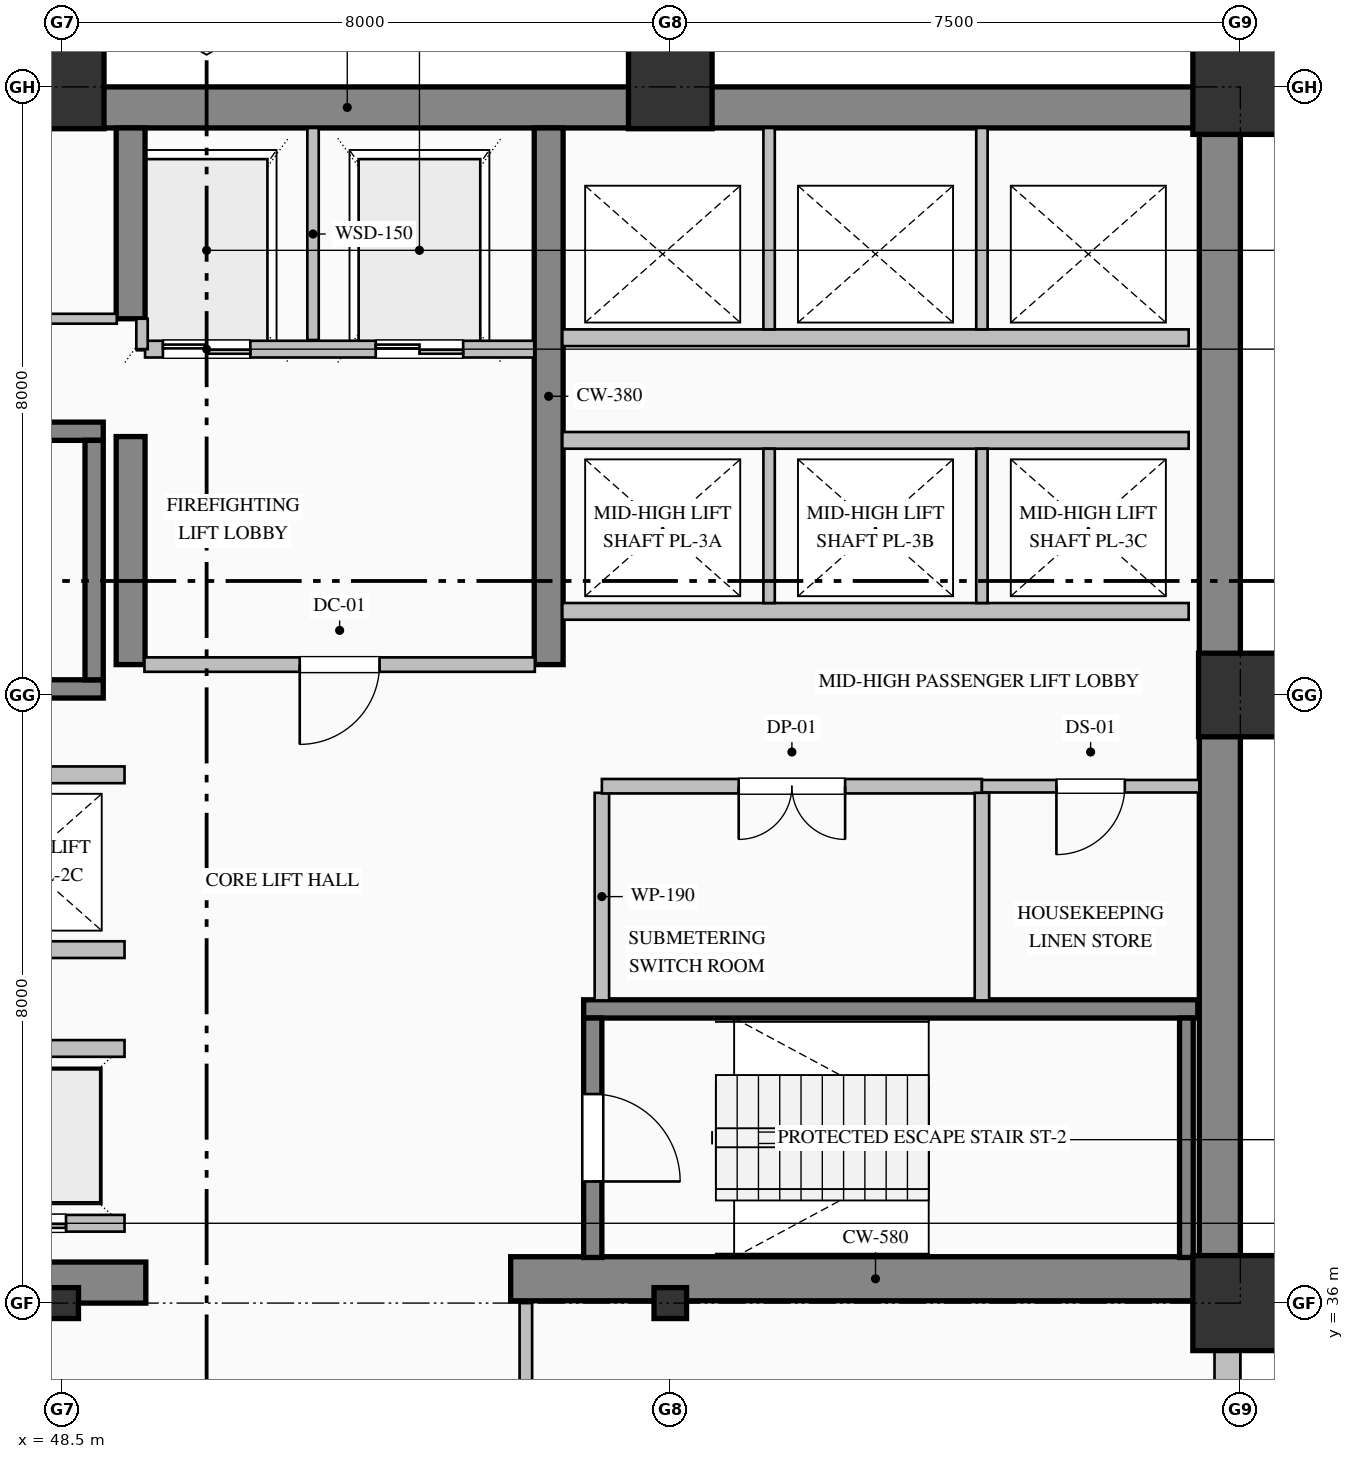
"""IFC4 building model, lengths in metres.
Left out: names, types, materials, properties, quantities, classifications, styles, units other than length and angle.
Written with IfcOpenShell. Run it as: python <this file> out.ifc"""

import sys

from ifc_helpers import new_model, si_unit, direction, frame, frame_2d, origin, origin_2d, place, context, subcontext, project, spatial, rectangle, hollow_rectangle, i_section, extrude, element, fill, save


model = new_model("IFC4")
c1 = context("Model", 3, precision=1e-05, world=origin(), true_north=direction((0.0, 1.0)))
c2 = subcontext(c1, "Body", "Model", "MODEL_VIEW")
j1 = project(units=[si_unit("LENGTHUNIT", "METRE"), si_unit("PLANEANGLEUNIT", "RADIAN")], contexts=[c1])
p1 = place(None, origin())
s1 = spatial("IfcSite", under=j1, at=p1, CompositionType="ELEMENT")
p2 = place(p1, origin())
s2 = spatial("IfcBuilding", under=s1, at=p2, CompositionType="ELEMENT")
p3 = place(p2, frame((0.0, 0.0, 64.2)))
s3 = spatial("IfcBuildingStorey", under=s2, at=p3, CompositionType="ELEMENT", Elevation=64.2)
p4 = place(p3, frame((40.5, 51.73, 0.0), z_axis=(0.0, 0.0, 1.0), x_axis=(1.0, 0.0, 0.0)))
e1 = element("IfcWall", 1, at=p4, inside=s3, PredefinedType="SHEAR", context=c2, shape_type="SweptSolid", body=[
    extrude(rectangle(XDim=23.5, YDim=0.54, at=frame_2d((11.75, 0.0))), origin(), (0.0, 0.0, 1.0), 3.75),
])
p5 = place(p3, frame((63.73, 36.32, 0.0), z_axis=(0.0, 0.0, 1.0), x_axis=(0.0, 1.0, 0.0)))
e2 = element("IfcWall", 2, at=p5, inside=s3, PredefinedType="SHEAR", context=c2, shape_type="SweptSolid", body=[
    extrude(rectangle(XDim=15.14, YDim=0.54, at=frame_2d((7.57, 0.0))), origin(), (0.0, 0.0, 1.0), 3.75),
])
p6 = place(p3, frame((48.2, 36.27, 0.0), z_axis=(0.0, 0.0, 1.0), x_axis=(1.0, 0.0, 0.0)))
e3 = element("IfcWall", 3, at=p6, inside=s3, PredefinedType="SHEAR", context=c2, shape_type="SweptSolid", body=[
    extrude(rectangle(XDim=1.4, YDim=0.54, at=frame_2d((0.7, 0.0))), origin(), (0.0, 0.0, 1.0), 3.75),
])
p7 = place(p3, frame((54.4, 36.32, 0.0), z_axis=(0.0, 0.0, 1.0), x_axis=(1.0, 0.0, 0.0)))
e4 = element("IfcWall", 4, at=p7, inside=s3, PredefinedType="SHEAR", context=c2, shape_type="SweptSolid", body=[
    extrude(rectangle(XDim=9.6, YDim=0.58, at=frame_2d((4.8, 0.0))), origin(), (0.0, 0.0, 1.0), 4.0),
])
p8 = place(p3, frame((49.4, 44.4, 0.0), z_axis=(0.0, 0.0, 1.0), x_axis=(0.0, 1.0, 0.0)))
e5 = element("IfcWall", 5, at=p8, inside=s3, PredefinedType="SHEAR", context=c2, shape_type="SweptSolid", body=[
    extrude(rectangle(XDim=3.0, YDim=0.38, at=frame_2d((1.5, 0.0))), origin(), (0.0, 0.0, 1.0), 3.75),
])
p9 = place(p3, frame((49.4, 48.95, 0.0), z_axis=(0.0, 0.0, 1.0), x_axis=(0.0, 1.0, 0.0)))
e6 = element("IfcWall", 6, at=p9, inside=s3, PredefinedType="SHEAR", context=c2, shape_type="SweptSolid", body=[
    extrude(rectangle(XDim=2.51, YDim=0.38, at=frame_2d((1.255, 0.0))), origin(), (0.0, 0.0, 1.0), 3.75),
])
p10 = place(p3, frame((54.9, 44.4, 0.0), z_axis=(0.0, 0.0, 1.0), x_axis=(0.0, 1.0, 0.0)))
e7 = element("IfcWall", 7, at=p10, inside=s3, PredefinedType="SHEAR", context=c2, shape_type="SweptSolid", body=[
    extrude(rectangle(XDim=7.06, YDim=0.38, at=frame_2d((3.53, 0.0))), origin(), (0.0, 0.0, 1.0), 3.75),
])
p11 = place(p3, frame((48.5, 36.0, 0.0), z_axis=(0.0, 0.0, 1.0), x_axis=(1.0, 0.0, 0.0)))
e8 = element("IfcColumn", 8, at=p11, inside=s3, PredefinedType="COLUMN", context=c2, shape_type="SweptSolid", body=[
    extrude(i_section(OverallWidth=0.407, OverallDepth=0.428, WebThickness=0.02, FlangeThickness=0.035, FilletRadius=0.022, at=origin_2d()), origin(), (0.0, 0.0, 1.0), 4.0),
])
p12 = place(p3, frame((48.5, 52.0, 0.0), z_axis=(0.0, 0.0, 1.0), x_axis=(1.0, 0.0, 0.0)))
e9 = element("IfcColumn", 9, at=p12, inside=s3, PredefinedType="COLUMN", context=c2, shape_type="SweptSolid", body=[
    extrude(hollow_rectangle(XDim=1.1, YDim=1.1, WallThickness=0.04, at=origin_2d()), origin(), (0.0, 0.0, 1.0), 4.0),
])
p13 = place(p3, frame((56.5, 36.0, 0.0), z_axis=(0.0, 0.0, 1.0), x_axis=(1.0, 0.0, 0.0)))
e10 = element("IfcColumn", 10, at=p13, inside=s3, PredefinedType="COLUMN", context=c2, shape_type="SweptSolid", body=[
    extrude(i_section(OverallWidth=0.407, OverallDepth=0.428, WebThickness=0.02, FlangeThickness=0.035, FilletRadius=0.022, at=origin_2d()), origin(), (0.0, 0.0, 1.0), 4.0),
])
p14 = place(p3, frame((56.5, 52.0, 0.0), z_axis=(0.0, 0.0, 1.0), x_axis=(1.0, 0.0, 0.0)))
e11 = element("IfcColumn", 11, at=p14, inside=s3, PredefinedType="COLUMN", context=c2, shape_type="SweptSolid", body=[
    extrude(hollow_rectangle(XDim=1.1, YDim=1.1, WallThickness=0.04, at=origin_2d()), origin(), (0.0, 0.0, 1.0), 4.0),
])
p15 = place(p3, frame((64.0, 36.0, 0.0), z_axis=(0.0, 0.0, 1.0), x_axis=(1.0, 0.0, 0.0)))
e12 = element("IfcColumn", 12, at=p15, inside=s3, PredefinedType="COLUMN", context=c2, shape_type="SweptSolid", body=[
    extrude(hollow_rectangle(XDim=1.25, YDim=1.25, WallThickness=0.045, at=origin_2d()), origin(), (0.0, 0.0, 1.0), 4.0),
])
p16 = place(p3, frame((64.0, 44.0, 0.0), z_axis=(0.0, 0.0, 1.0), x_axis=(1.0, 0.0, 0.0)))
e13 = element("IfcColumn", 13, at=p16, inside=s3, PredefinedType="COLUMN", context=c2, shape_type="SweptSolid", body=[
    extrude(hollow_rectangle(XDim=1.1, YDim=1.1, WallThickness=0.04, at=origin_2d()), origin(), (0.0, 0.0, 1.0), 4.0),
])
p17 = place(p3, frame((64.0, 52.0, 0.0), z_axis=(0.0, 0.0, 1.0), x_axis=(1.0, 0.0, 0.0)))
e14 = element("IfcColumn", 14, at=p17, inside=s3, PredefinedType="COLUMN", context=c2, shape_type="SweptSolid", body=[
    extrude(hollow_rectangle(XDim=1.25, YDim=1.25, WallThickness=0.045, at=origin_2d()), origin(), (0.0, 0.0, 1.0), 4.0),
])
p18 = place(p3, frame((63.83, 36.05, 0.0), z_axis=(0.0, 0.0, 1.0), x_axis=(0.0, -1.0, 0.0)))
e15 = element("IfcWall", 15, at=p18, inside=s3, PredefinedType="SOLIDWALL", context=c2, shape_type="SweptSolid", body=[
    extrude(rectangle(XDim=28.05, YDim=0.34, at=frame_2d((14.025, 0.0))), origin(), (0.0, 0.0, 1.0), 3.25),
])
p19 = place(p18, frame((2.7, 0.0, 0.85)))
e16 = element("IfcOpeningElement", 16, at=p19, cuts=e15, PredefinedType="OPENING", context=c2, shape_type="SweptSolid", body=[
    extrude(rectangle(XDim=1.8, YDim=2.05, at=frame_2d((0.9, 1.025))), frame((0.0, 0.18, 0.0), z_axis=(0.0, -1.0, 0.0), x_axis=(1.0, 0.0, 0.0)), (0.0, 0.0, 1.0), 0.36),
])
p20 = place(p18, frame((9.6, 0.0, 0.8)))
e17 = element("IfcOpeningElement", 17, at=p20, cuts=e15, PredefinedType="OPENING", context=c2, shape_type="SweptSolid", body=[
    extrude(rectangle(XDim=2.4, YDim=2.15, at=frame_2d((1.2, 1.075))), frame((0.0, 0.18, 0.0), z_axis=(0.0, -1.0, 0.0), x_axis=(1.0, 0.0, 0.0)), (0.0, 0.0, 1.0), 0.36),
])
for number, where, z_axis, x_axis in (
    (18, (40.96, 47.47, 0.0), (0.0, 0.0, 1.0), (1.0, 0.0, 0.0)),
    (19, (49.04, 44.08, 0.0), (0.0, 0.0, 1.0), (-1.0, 0.0, 0.0)),
):
    element("IfcWall", number, at=place(p3, frame(where, z_axis=z_axis, x_axis=x_axis)), inside=s3, PredefinedType="SOLIDWALL", context=c2, shape_type="SweptSolid", body=[
        extrude(rectangle(XDim=8.08, YDim=0.24, at=frame_2d((4.04, 0.0))), origin(), (0.0, 0.0, 1.0), 4.0),
    ])
p21 = place(p3, frame((48.92, 44.2, 0.0), z_axis=(0.0, 0.0, 1.0), x_axis=(0.0, 1.0, 0.0)))
e20 = element("IfcWall", 20, at=p21, inside=s3, PredefinedType="SOLIDWALL", context=c2, shape_type="SweptSolid", body=[
    extrude(rectangle(XDim=3.15, YDim=0.24, at=frame_2d((1.575, 0.0))), origin(), (0.0, 0.0, 1.0), 4.0),
])
p22 = place(p3, frame((55.36, 39.87, 0.0), z_axis=(0.0, 0.0, 1.0), x_axis=(1.0, 0.0, 0.0)))
e21 = element("IfcWall", 21, at=p22, inside=s3, PredefinedType="SOLIDWALL", context=c2, shape_type="SweptSolid", body=[
    extrude(rectangle(XDim=8.08, YDim=0.24, at=frame_2d((4.04, 0.0))), origin(), (0.0, 0.0, 1.0), 4.0),
])
p23 = place(p3, frame((55.48, 39.75, 0.0), z_axis=(0.0, 0.0, 1.0), x_axis=(0.0, -1.0, 0.0)))
e22 = element("IfcWall", 22, at=p23, inside=s3, PredefinedType="SOLIDWALL", context=c2, shape_type="SweptSolid", body=[
    extrude(rectangle(XDim=3.15, YDim=0.24, at=frame_2d((1.575, 0.0))), origin(), (0.0, 0.0, 1.0), 4.0),
])
p24 = place(p23, frame((1.0, 0.0, 0.0)))
e23 = element("IfcOpeningElement", 23, at=p24, cuts=e22, PredefinedType="OPENING", context=c2, shape_type="SweptSolid", body=[
    extrude(rectangle(XDim=1.15, YDim=2.2, at=frame_2d((0.575, 1.1))), frame((0.0, 0.13, 0.0), z_axis=(0.0, -1.0, 0.0), x_axis=(1.0, 0.0, 0.0)), (0.0, 0.0, 1.0), 0.26),
])
p25 = place(p3, frame((63.29, 36.6, 0.0), z_axis=(0.0, 0.0, 1.0), x_axis=(0.0, 1.0, 0.0)))
e24 = element("IfcWall", 24, at=p25, inside=s3, PredefinedType="SOLIDWALL", context=c2, shape_type="SweptSolid", body=[
    extrude(rectangle(XDim=3.15, YDim=0.18, at=frame_2d((1.575, 0.0))), origin(), (0.0, 0.0, 1.0), 4.0),
])
p26 = place(p3, frame((54.71, 48.55, 0.0), z_axis=(0.0, 0.0, 1.0), x_axis=(-1.0, 0.0, 0.0)))
e25 = element("IfcWall", 25, at=p26, inside=s3, PredefinedType="PARTITIONING", context=c2, shape_type="SweptSolid", body=[
    extrude(rectangle(XDim=5.12, YDim=0.22, at=frame_2d((2.56, 0.0))), origin(), (0.0, 0.0, 1.0), 3.75),
])
p27 = place(p26, frame((3.735, 0.0, 0.0)))
e26 = element("IfcOpeningElement", 26, at=p27, cuts=e25, PredefinedType="OPENING", context=c2, shape_type="SweptSolid", body=[
    extrude(rectangle(XDim=1.15, YDim=2.2, at=frame_2d((0.575, 1.1))), frame((0.0, 0.12, 0.0), z_axis=(0.0, -1.0, 0.0), x_axis=(1.0, 0.0, 0.0)), (0.0, 0.0, 1.0), 0.24),
])
p28 = place(p26, frame((0.935, 0.0, 0.0)))
e27 = element("IfcOpeningElement", 27, at=p28, cuts=e25, PredefinedType="OPENING", context=c2, shape_type="SweptSolid", body=[
    extrude(rectangle(XDim=1.15, YDim=2.2, at=frame_2d((0.575, 1.1))), frame((0.0, 0.12, 0.0), z_axis=(0.0, -1.0, 0.0), x_axis=(1.0, 0.0, 0.0)), (0.0, 0.0, 1.0), 0.24),
])
p29 = place(p3, frame((51.8, 48.67, 0.0), z_axis=(0.0, 0.0, 1.0), x_axis=(0.0, 1.0, 0.0)))
e28 = element("IfcWall", 28, at=p29, inside=s3, PredefinedType="PARTITIONING", context=c2, shape_type="SweptSolid", body=[
    extrude(rectangle(XDim=2.79, YDim=0.15, at=frame_2d((1.395, 0.0))), origin(), (0.0, 0.0, 1.0), 3.75),
])
p30 = place(p3, frame((49.55, 48.55, 0.0), z_axis=(0.0, 0.0, 1.0), x_axis=(0.0, 1.0, 0.0)))
e29 = element("IfcWall", 29, at=p30, inside=s3, PredefinedType="PARTITIONING", context=c2, shape_type="SweptSolid", body=[
    extrude(rectangle(XDim=0.4, YDim=0.15, at=frame_2d((0.2, 0.0))), origin(), (0.0, 0.0, 1.0), 3.75),
])
p31 = place(p3, frame((49.32, 37.05, 0.0), z_axis=(0.0, 0.0, 1.0), x_axis=(-1.0, 0.0, 0.0)))
e30 = element("IfcWall", 30, at=p31, inside=s3, PredefinedType="PARTITIONING", context=c2, shape_type="SweptSolid", body=[
    extrude(rectangle(XDim=8.24, YDim=0.22, at=frame_2d((4.12, 0.0))), origin(), (0.0, 0.0, 1.0), 3.75),
])
p32 = place(p31, frame((6.37, 0.0, 0.0)))
e31 = element("IfcOpeningElement", 31, at=p32, cuts=e30, PredefinedType="OPENING", context=c2, shape_type="SweptSolid", body=[
    extrude(rectangle(XDim=1.1, YDim=2.2, at=frame_2d((0.55, 1.1))), frame((0.0, 0.12, 0.0), z_axis=(0.0, -1.0, 0.0), x_axis=(1.0, 0.0, 0.0)), (0.0, 0.0, 1.0), 0.24),
])
p33 = place(p31, frame((3.57, 0.0, 0.0)))
e32 = element("IfcOpeningElement", 32, at=p33, cuts=e30, PredefinedType="OPENING", context=c2, shape_type="SweptSolid", body=[
    extrude(rectangle(XDim=1.1, YDim=2.2, at=frame_2d((0.55, 1.1))), frame((0.0, 0.12, 0.0), z_axis=(0.0, -1.0, 0.0), x_axis=(1.0, 0.0, 0.0)), (0.0, 0.0, 1.0), 0.24),
])
p34 = place(p31, frame((0.77, 0.0, 0.0)))
e33 = element("IfcOpeningElement", 33, at=p34, cuts=e30, PredefinedType="OPENING", context=c2, shape_type="SweptSolid", body=[
    extrude(rectangle(XDim=1.1, YDim=2.2, at=frame_2d((0.55, 1.1))), frame((0.0, 0.12, 0.0), z_axis=(0.0, -1.0, 0.0), x_axis=(1.0, 0.0, 0.0)), (0.0, 0.0, 1.0), 0.24),
])
for number, where, z_axis, x_axis in (
    (34, (41.08, 39.35, 0.0), (0.0, 0.0, 1.0), (1.0, 0.0, 0.0)),
    (35, (49.32, 40.65, 0.0), (0.0, 0.0, 1.0), (-1.0, 0.0, 0.0)),
    (36, (41.08, 42.95, 0.0), (0.0, 0.0, 1.0), (1.0, 0.0, 0.0)),
    (37, (63.32, 45.1, 0.0), (0.0, 0.0, 1.0), (-1.0, 0.0, 0.0)),
    (38, (55.08, 47.35, 0.0), (0.0, 0.0, 1.0), (1.0, 0.0, 0.0)),
):
    element("IfcWall", number, at=place(p3, frame(where, z_axis=z_axis, x_axis=x_axis)), inside=s3, PredefinedType="PARTITIONING", context=c2, shape_type="SweptSolid", body=[
        extrude(rectangle(XDim=8.24, YDim=0.22, at=frame_2d((4.12, 0.0))), origin(), (0.0, 0.0, 1.0), 3.75),
    ])
for number, where, z_axis, x_axis in (
    (39, (57.8, 45.21, 0.0), (0.0, 0.0, 1.0), (0.0, 1.0, 0.0)),
    (40, (60.6, 45.21, 0.0), (0.0, 0.0, 1.0), (0.0, 1.0, 0.0)),
):
    element("IfcWall", number, at=place(p3, frame(where, z_axis=z_axis, x_axis=x_axis)), inside=s3, PredefinedType="PARTITIONING", context=c2, shape_type="SweptSolid", body=[
        extrude(rectangle(XDim=2.03, YDim=0.15, at=frame_2d((1.015, 0.0))), origin(), (0.0, 0.0, 1.0), 3.75),
    ])
p35 = place(p3, frame((63.32, 48.7, 0.0), z_axis=(0.0, 0.0, 1.0), x_axis=(-1.0, 0.0, 0.0)))
e41 = element("IfcWall", 41, at=p35, inside=s3, PredefinedType="PARTITIONING", context=c2, shape_type="SweptSolid", body=[
    extrude(rectangle(XDim=8.24, YDim=0.22, at=frame_2d((4.12, 0.0))), origin(), (0.0, 0.0, 1.0), 3.75),
])
for number, where, z_axis, x_axis in (
    (42, (57.8, 48.81, 0.0), (0.0, 0.0, 1.0), (0.0, 1.0, 0.0)),
    (43, (60.6, 48.81, 0.0), (0.0, 0.0, 1.0), (0.0, 1.0, 0.0)),
):
    element("IfcWall", number, at=place(p3, frame(where, z_axis=z_axis, x_axis=x_axis)), inside=s3, PredefinedType="PARTITIONING", context=c2, shape_type="SweptSolid", body=[
        extrude(rectangle(XDim=2.65, YDim=0.15, at=frame_2d((1.325, 0.0))), origin(), (0.0, 0.0, 1.0), 3.75),
    ])
p36 = place(p3, frame((43.5, 48.95, 0.0), z_axis=(0.0, 0.0, 1.0), x_axis=(1.0, 0.0, 0.0)))
e44 = element("IfcWall", 44, at=p36, inside=s3, PredefinedType="PARTITIONING", context=c2, shape_type="SweptSolid", body=[
    extrude(rectangle(XDim=5.718, YDim=0.13, at=frame_2d((2.859, 0.0))), origin(), (0.0, 0.0, 1.0), 3.75),
])
p37 = place(p36, frame((2.399, 0.0, 0.0)))
e45 = element("IfcOpeningElement", 45, at=p37, cuts=e44, PredefinedType="OPENING", context=c2, shape_type="SweptSolid", body=[
    extrude(rectangle(XDim=0.92, YDim=2.15, at=frame_2d((0.46, 1.075))), frame((0.0, 0.075, 0.0), z_axis=(0.0, -1.0, 0.0), x_axis=(1.0, 0.0, 0.0)), (0.0, 0.0, 1.0), 0.15),
])
p38 = place(p3, frame((54.718, 44.4, 0.0), z_axis=(0.0, 0.0, 1.0), x_axis=(-1.0, 0.0, 0.0)))
e46 = element("IfcWall", 46, at=p38, inside=s3, PredefinedType="PARTITIONING", context=c2, shape_type="SweptSolid", body=[
    extrude(rectangle(XDim=5.136, YDim=0.19, at=frame_2d((2.568, 0.0))), origin(), (0.0, 0.0, 1.0), 3.75),
])
p39 = place(p38, frame((2.043, 0.0, 0.0)))
e47 = element("IfcOpeningElement", 47, at=p39, cuts=e46, PredefinedType="OPENING", context=c2, shape_type="SweptSolid", body=[
    extrude(rectangle(XDim=1.05, YDim=2.15, at=frame_2d((0.525, 1.075))), frame((0.0, 0.105, 0.0), z_axis=(0.0, -1.0, 0.0), x_axis=(1.0, 0.0, 0.0)), (0.0, 0.0, 1.0), 0.21),
])
p40 = place(p3, frame((55.6, 42.713, 0.0), z_axis=(0.0, 0.0, 1.0), x_axis=(0.0, -1.0, 0.0)))
e48 = element("IfcWall", 48, at=p40, inside=s3, PredefinedType="PARTITIONING", context=c2, shape_type="SweptSolid", body=[
    extrude(rectangle(XDim=2.731, YDim=0.19, at=frame_2d((1.365, 0.0))), origin(), (0.0, 0.0, 1.0), 3.75),
])
p41 = place(p3, frame((60.6, 42.8, 0.0), z_axis=(0.0, 0.0, 1.0), x_axis=(-1.0, 0.0, 0.0)))
e49 = element("IfcWall", 49, at=p41, inside=s3, PredefinedType="PARTITIONING", context=c2, shape_type="SweptSolid", body=[
    extrude(rectangle(XDim=5.0, YDim=0.19, at=frame_2d((2.5, 0.0))), origin(), (0.0, 0.0, 1.0), 3.75),
])
p42 = place(p41, frame((1.8, 0.0, 0.0)))
e50 = element("IfcOpeningElement", 50, at=p42, cuts=e49, PredefinedType="OPENING", context=c2, shape_type="SweptSolid", body=[
    extrude(rectangle(XDim=1.4, YDim=2.25, at=frame_2d((0.7, 1.125))), frame((0.0, 0.105, 0.0), z_axis=(0.0, -1.0, 0.0), x_axis=(1.0, 0.0, 0.0)), (0.0, 0.0, 1.0), 0.21),
])
p43 = place(p3, frame((63.46, 42.8, 0.0), z_axis=(0.0, 0.0, 1.0), x_axis=(-1.0, 0.0, 0.0)))
e51 = element("IfcWall", 51, at=p43, inside=s3, PredefinedType="PARTITIONING", context=c2, shape_type="SweptSolid", body=[
    extrude(rectangle(XDim=2.86, YDim=0.165, at=frame_2d((1.43, 0.0))), origin(), (0.0, 0.0, 1.0), 3.75),
])
p44 = place(p43, frame((0.98, 0.0, 0.0)))
e52 = element("IfcOpeningElement", 52, at=p44, cuts=e51, PredefinedType="OPENING", context=c2, shape_type="SweptSolid", body=[
    extrude(rectangle(XDim=0.9, YDim=2.15, at=frame_2d((0.45, 1.075))), frame((0.0, 0.093, 0.0), z_axis=(0.0, -1.0, 0.0), x_axis=(1.0, 0.0, 0.0)), (0.0, 0.0, 1.0), 0.185),
])
p45 = place(p3, frame((60.6, 42.713, 0.0), z_axis=(0.0, 0.0, 1.0), x_axis=(0.0, -1.0, 0.0)))
e53 = element("IfcWall", 53, at=p45, inside=s3, PredefinedType="PARTITIONING", context=c2, shape_type="SweptSolid", body=[
    extrude(rectangle(XDim=2.731, YDim=0.19, at=frame_2d((1.365, 0.0))), origin(), (0.0, 0.0, 1.0), 3.75),
])
p46 = place(p3, frame((54.6, 36.0, 0.0), z_axis=(0.0, 0.0, 1.0), x_axis=(0.0, -1.0, 0.0)))
e54 = element("IfcWall", 54, at=p46, inside=s3, PredefinedType="PARTITIONING", context=c2, shape_type="SweptSolid", body=[
    extrude(rectangle(XDim=2.125, YDim=0.165, at=frame_2d((1.063, 0.0))), origin(), (0.0, 0.0, 1.0), 3.75),
])
p47 = place(p24, origin())
e55 = element("IfcDoor", 55, at=p47, inside=s3, OperationType="SINGLE_SWING_RIGHT", PredefinedType="DOOR", context=c2, shape_type="SweptSolid", body=[
    extrude(rectangle(XDim=1.15, YDim=2.2, at=frame_2d((0.575, 1.1))), frame((0.0, 0.025, 0.0), z_axis=(0.0, -1.0, 0.0), x_axis=(1.0, 0.0, 0.0)), (0.0, 0.0, 1.0), 0.05),
])
fill(e23, e55)
p48 = place(p27, origin())
e56 = element("IfcDoor", 56, at=p48, inside=s3, OperationType="DOUBLE_DOOR_SLIDING", PredefinedType="DOOR", context=c2, shape_type="SweptSolid", body=[
    extrude(rectangle(XDim=1.15, YDim=2.2, at=frame_2d((0.575, 1.1))), frame((0.0, 0.025, 0.0), z_axis=(0.0, -1.0, 0.0), x_axis=(1.0, 0.0, 0.0)), (0.0, 0.0, 1.0), 0.05),
])
fill(e26, e56)
p49 = place(p28, origin())
e57 = element("IfcDoor", 57, at=p49, inside=s3, OperationType="DOUBLE_DOOR_SLIDING", PredefinedType="DOOR", context=c2, shape_type="SweptSolid", body=[
    extrude(rectangle(XDim=1.15, YDim=2.2, at=frame_2d((0.575, 1.1))), frame((0.0, 0.025, 0.0), z_axis=(0.0, -1.0, 0.0), x_axis=(1.0, 0.0, 0.0)), (0.0, 0.0, 1.0), 0.05),
])
fill(e27, e57)
p50 = place(p34, origin())
e58 = element("IfcDoor", 58, at=p50, inside=s3, OperationType="DOUBLE_DOOR_SLIDING", PredefinedType="DOOR", context=c2, shape_type="SweptSolid", body=[
    extrude(rectangle(XDim=1.1, YDim=2.2, at=frame_2d((0.55, 1.1))), frame((0.0, 0.025, 0.0), z_axis=(0.0, -1.0, 0.0), x_axis=(1.0, 0.0, 0.0)), (0.0, 0.0, 1.0), 0.05),
])
fill(e33, e58)
p51 = place(p39, origin())
e59 = element("IfcDoor", 59, at=p51, inside=s3, OperationType="SINGLE_SWING_RIGHT", PredefinedType="DOOR", context=c2, shape_type="SweptSolid", body=[
    extrude(rectangle(XDim=1.05, YDim=2.15, at=frame_2d((0.525, 1.075))), frame((0.0, 0.025, 0.0), z_axis=(0.0, -1.0, 0.0), x_axis=(1.0, 0.0, 0.0)), (0.0, 0.0, 1.0), 0.05),
])
fill(e47, e59)
p52 = place(p42, origin())
e60 = element("IfcDoor", 60, at=p52, inside=s3, OperationType="DOUBLE_DOOR_SINGLE_SWING", PredefinedType="DOOR", context=c2, shape_type="SweptSolid", body=[
    extrude(rectangle(XDim=1.4, YDim=2.25, at=frame_2d((0.7, 1.125))), frame((0.0, 0.025, 0.0), z_axis=(0.0, -1.0, 0.0), x_axis=(1.0, 0.0, 0.0)), (0.0, 0.0, 1.0), 0.05),
])
fill(e50, e60)
p53 = place(p44, origin())
e61 = element("IfcDoor", 61, at=p53, inside=s3, OperationType="SINGLE_SWING_RIGHT", PredefinedType="DOOR", context=c2, shape_type="SweptSolid", body=[
    extrude(rectangle(XDim=0.9, YDim=2.15, at=frame_2d((0.45, 1.075))), frame((0.0, 0.025, 0.0), z_axis=(0.0, -1.0, 0.0), x_axis=(1.0, 0.0, 0.0)), (0.0, 0.0, 1.0), 0.05),
])
fill(e52, e61)
save(model, sys.argv[1])
